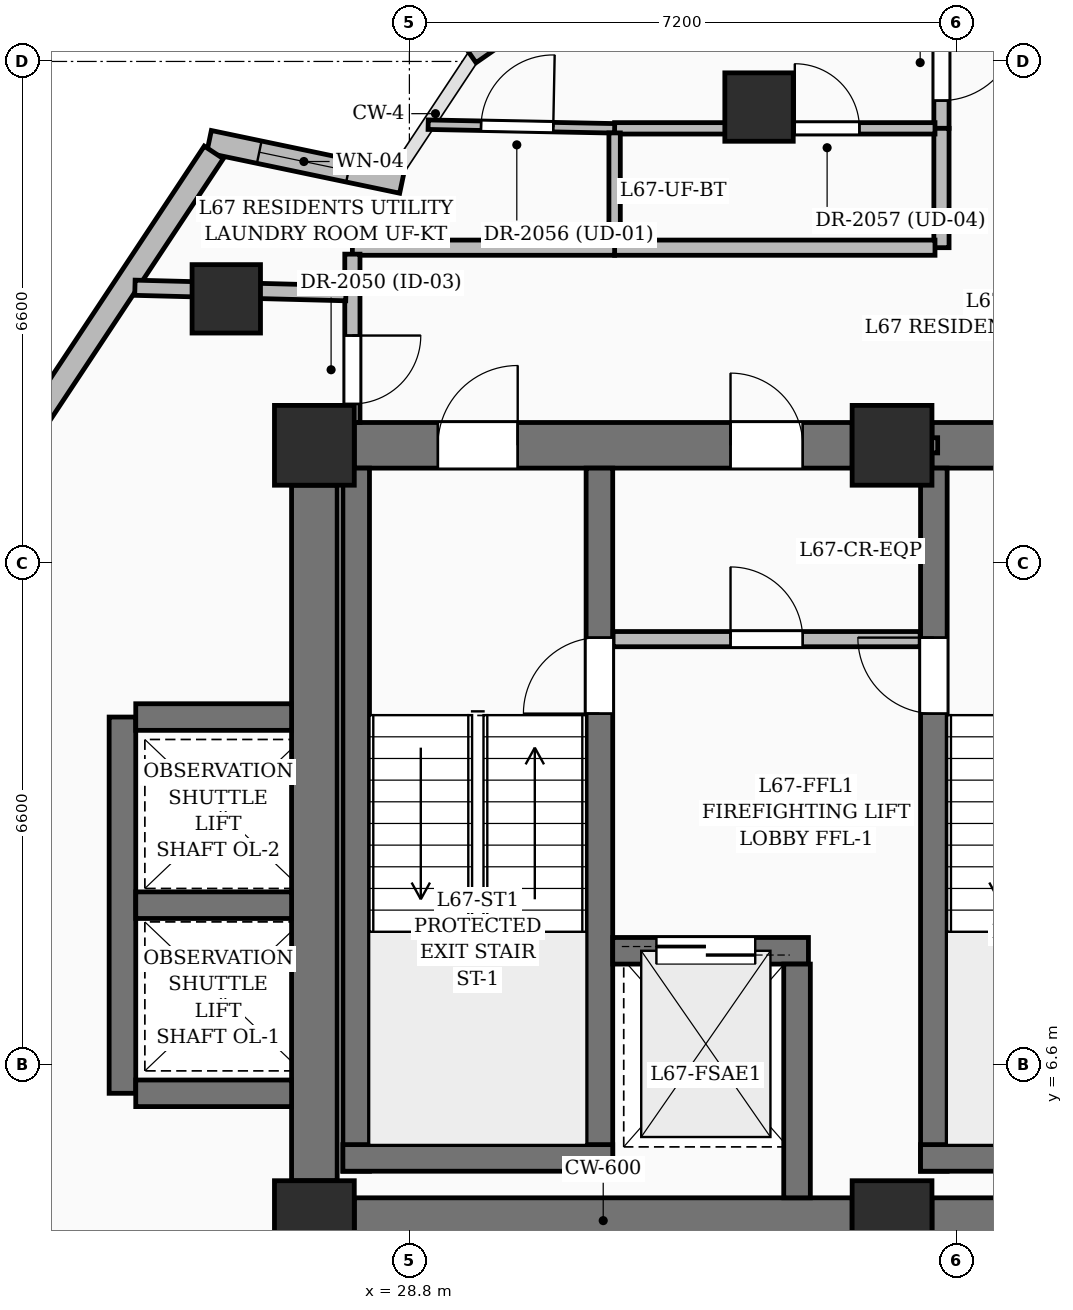
"""IFC4 building model, lengths in metres.
Left out: names, types, materials, properties, quantities, classifications, styles, units other than length and angle.
Written with IfcOpenShell. Run it as: python <this file> out.ifc"""

import sys

from ifc_helpers import new_model, si_unit, direction, frame, frame_2d, origin, origin_2d, place, context, subcontext, project, spatial, rectangle, extrude, element, fill, save


model = new_model("IFC4")
c1 = context("Model", 3, precision=1e-05, world=origin(), true_north=direction((0.0, 1.0)))
c2 = subcontext(c1, "Body", "Model", "MODEL_VIEW")
j1 = project(units=[si_unit("LENGTHUNIT", "METRE"), si_unit("PLANEANGLEUNIT", "RADIAN")], contexts=[c1])
p1 = place(None, origin())
s1 = spatial("IfcSite", under=j1, at=p1, CompositionType="ELEMENT")
p2 = place(p1, origin())
s2 = spatial("IfcBuilding", under=s1, at=p2, CompositionType="ELEMENT")
p3 = place(p2, frame((0.0, 0.0, 259.5)))
s3 = spatial("IfcBuildingStorey", under=s2, at=p3, CompositionType="ELEMENT", Elevation=259.5)
for number, where, z_axis, x_axis in (
    (1, (27.55, 4.55, 0.0), (0.0, 0.0, 1.0), (1.0, 0.0, 0.0)),
    (2, (35.15, 4.55, 0.0), (0.0, 0.0, 1.0), (1.0, 0.0, 0.0)),
    (3, (27.55, 14.75, 0.0), (0.0, 0.0, 1.0), (1.0, 0.0, 0.0)),
    (4, (35.15, 14.75, 0.0), (0.0, 0.0, 1.0), (1.0, 0.0, 0.0)),
):
    element("IfcColumn", number, at=place(p3, frame(where, z_axis=z_axis, x_axis=x_axis)), inside=s3, PredefinedType="COLUMN", context=c2, shape_type="SweptSolid", body=[
        extrude(rectangle(XDim=1.05, YDim=1.05, at=origin_2d()), origin(), (0.0, 0.0, 1.0), 3.75),
    ])
p4 = place(p3, frame((33.4, 19.2, 0.0), z_axis=(0.0, 0.0, 1.0), x_axis=(1.0, 0.0, 0.0)))
e5 = element("IfcColumn", 5, at=p4, inside=s3, PredefinedType="COLUMN", context=c2, shape_type="SweptSolid", body=[
    extrude(rectangle(XDim=0.9, YDim=0.9, at=origin_2d()), origin(), (0.0, 0.0, 1.0), 3.75),
])
p5 = place(p3, frame((28.075, 4.55, 0.0), z_axis=(0.0, 0.0, 1.0), x_axis=(1.0, 0.0, 0.0)))
e6 = element("IfcWall", 6, at=p5, inside=s3, PredefinedType="SHEAR", context=c2, shape_type="SweptSolid", body=[
    extrude(rectangle(XDim=6.55, YDim=0.6, at=frame_2d((3.275, 0.0))), origin(), (0.0, 0.0, 1.0), 3.75),
])
p6 = place(p3, frame((35.675, 4.55, 0.0), z_axis=(0.0, 0.0, 1.0), x_axis=(1.0, 0.0, 0.0)))
e7 = element("IfcWall", 7, at=p6, inside=s3, PredefinedType="SHEAR", context=c2, shape_type="SweptSolid", body=[
    extrude(rectangle(XDim=10.85, YDim=0.6, at=frame_2d((5.425, 0.0))), origin(), (0.0, 0.0, 1.0), 3.75),
])
p7 = place(p3, frame((28.075, 14.75, 0.0), z_axis=(0.0, 0.0, 1.0), x_axis=(1.0, 0.0, 0.0)))
e8 = element("IfcWall", 8, at=p7, inside=s3, PredefinedType="SHEAR", context=c2, shape_type="SweptSolid", body=[
    extrude(rectangle(XDim=6.55, YDim=0.6, at=frame_2d((3.275, 0.0))), origin(), (0.0, 0.0, 1.0), 3.75),
])
p8 = place(p7, frame((1.1, 0.0, 0.0)))
e9 = element("IfcOpeningElement", 9, at=p8, cuts=e8, PredefinedType="OPENING", context=c2, shape_type="SweptSolid", body=[
    extrude(rectangle(XDim=1.05, YDim=2.15, at=frame_2d((0.525, 1.075))), frame((0.0, 0.31, 0.0), z_axis=(0.0, -1.0, 0.0), x_axis=(1.0, 0.0, 0.0)), (0.0, 0.0, 1.0), 0.62),
])
p9 = place(p7, frame((4.95, 0.0, 0.0)))
e10 = element("IfcOpeningElement", 10, at=p9, cuts=e8, PredefinedType="OPENING", context=c2, shape_type="SweptSolid", body=[
    extrude(rectangle(XDim=0.95, YDim=2.15, at=frame_2d((0.475, 1.075))), frame((0.0, 0.31, 0.0), z_axis=(0.0, -1.0, 0.0), x_axis=(1.0, 0.0, 0.0)), (0.0, 0.0, 1.0), 0.62),
])
p10 = place(p3, frame((35.675, 14.75, 0.0), z_axis=(0.0, 0.0, 1.0), x_axis=(1.0, 0.0, 0.0)))
e11 = element("IfcWall", 11, at=p10, inside=s3, PredefinedType="SHEAR", context=c2, shape_type="SweptSolid", body=[
    extrude(rectangle(XDim=10.85, YDim=0.6, at=frame_2d((5.425, 0.0))), origin(), (0.0, 0.0, 1.0), 3.75),
])
p11 = place(p10, frame((1.1, 0.0, 0.0)))
e12 = element("IfcOpeningElement", 12, at=p11, cuts=e11, PredefinedType="OPENING", context=c2, shape_type="SweptSolid", body=[
    extrude(rectangle(XDim=1.05, YDim=2.15, at=frame_2d((0.525, 1.075))), frame((0.0, 0.31, 0.0), z_axis=(0.0, -1.0, 0.0), x_axis=(1.0, 0.0, 0.0)), (0.0, 0.0, 1.0), 0.62),
])
p12 = place(p10, frame((8.7, 0.0, 0.0)))
e13 = element("IfcOpeningElement", 13, at=p12, cuts=e11, PredefinedType="OPENING", context=c2, shape_type="SweptSolid", body=[
    extrude(rectangle(XDim=1.05, YDim=2.15, at=frame_2d((0.525, 1.075))), frame((0.0, 0.31, 0.0), z_axis=(0.0, -1.0, 0.0), x_axis=(1.0, 0.0, 0.0)), (0.0, 0.0, 1.0), 0.62),
])
p13 = place(p10, frame((3.825, 0.0, 0.0)))
e14 = element("IfcOpeningElement", 14, at=p13, cuts=e11, PredefinedType="OPENING", context=c2, shape_type="SweptSolid", body=[
    extrude(rectangle(XDim=1.2, YDim=2.2, at=frame_2d((0.6, 1.1))), frame((0.0, 0.31, 0.0), z_axis=(0.0, -1.0, 0.0), x_axis=(1.0, 0.0, 0.0)), (0.0, 0.0, 1.0), 0.62),
])
p14 = place(p10, frame((5.825, 0.0, 0.0)))
e15 = element("IfcOpeningElement", 15, at=p14, cuts=e11, PredefinedType="OPENING", context=c2, shape_type="SweptSolid", body=[
    extrude(rectangle(XDim=1.2, YDim=2.2, at=frame_2d((0.6, 1.1))), frame((0.0, 0.31, 0.0), z_axis=(0.0, -1.0, 0.0), x_axis=(1.0, 0.0, 0.0)), (0.0, 0.0, 1.0), 0.62),
])
p15 = place(p3, frame((27.55, 5.075, 0.0), z_axis=(0.0, 0.0, 1.0), x_axis=(0.0, 1.0, 0.0)))
e16 = element("IfcWall", 16, at=p15, inside=s3, PredefinedType="SHEAR", context=c2, shape_type="SweptSolid", body=[
    extrude(rectangle(XDim=9.15, YDim=0.6, at=frame_2d((4.575, 0.0))), origin(), (0.0, 0.0, 1.0), 3.75),
])
p16 = place(p3, frame((28.1, 5.2, 0.0), z_axis=(0.0, 0.0, 1.0), x_axis=(0.0, 1.0, 0.0)))
e17 = element("IfcWall", 17, at=p16, inside=s3, PredefinedType="SOLIDWALL", context=c2, shape_type="SweptSolid", body=[
    extrude(rectangle(XDim=9.25, YDim=0.35, at=frame_2d((4.625, 0.0))), origin(), (0.0, 0.0, 1.0), 3.75),
])
p17 = place(p3, frame((31.3, 5.2, 0.0), z_axis=(0.0, 0.0, 1.0), x_axis=(0.0, 1.0, 0.0)))
e18 = element("IfcWall", 18, at=p17, inside=s3, PredefinedType="SOLIDWALL", context=c2, shape_type="SweptSolid", body=[
    extrude(rectangle(XDim=9.25, YDim=0.35, at=frame_2d((4.625, 0.0))), origin(), (0.0, 0.0, 1.0), 3.75),
])
p18 = place(p17, frame((6.02, 0.0, 0.0)))
e19 = element("IfcOpeningElement", 19, at=p18, cuts=e18, PredefinedType="OPENING", context=c2, shape_type="SweptSolid", body=[
    extrude(rectangle(XDim=1.0, YDim=2.15, at=frame_2d((0.5, 1.075))), frame((0.0, 0.185, 0.0), z_axis=(0.0, -1.0, 0.0), x_axis=(1.0, 0.0, 0.0)), (0.0, 0.0, 1.0), 0.37),
])
p19 = place(p3, frame((27.925, 5.375, 0.0), z_axis=(0.0, 0.0, 1.0), x_axis=(1.0, 0.0, 0.0)))
e20 = element("IfcWall", 20, at=p19, inside=s3, PredefinedType="SOLIDWALL", context=c2, shape_type="SweptSolid", body=[
    extrude(rectangle(XDim=3.55, YDim=0.35, at=frame_2d((1.775, 0.0))), origin(), (0.0, 0.0, 1.0), 3.75),
])
p20 = place(p3, frame((35.7, 5.2, 0.0), z_axis=(0.0, 0.0, 1.0), x_axis=(0.0, 1.0, 0.0)))
e21 = element("IfcWall", 21, at=p20, inside=s3, PredefinedType="SOLIDWALL", context=c2, shape_type="SweptSolid", body=[
    extrude(rectangle(XDim=9.25, YDim=0.35, at=frame_2d((4.625, 0.0))), origin(), (0.0, 0.0, 1.0), 3.75),
])
p21 = place(p20, frame((6.02, 0.0, 0.0)))
e22 = element("IfcOpeningElement", 22, at=p21, cuts=e21, PredefinedType="OPENING", context=c2, shape_type="SweptSolid", body=[
    extrude(rectangle(XDim=1.0, YDim=2.15, at=frame_2d((0.5, 1.075))), frame((0.0, 0.185, 0.0), z_axis=(0.0, -1.0, 0.0), x_axis=(1.0, 0.0, 0.0)), (0.0, 0.0, 1.0), 0.37),
])
p22 = place(p3, frame((35.525, 5.375, 0.0), z_axis=(0.0, 0.0, 1.0), x_axis=(1.0, 0.0, 0.0)))
e23 = element("IfcWall", 23, at=p22, inside=s3, PredefinedType="SOLIDWALL", context=c2, shape_type="SweptSolid", body=[
    extrude(rectangle(XDim=3.55, YDim=0.35, at=frame_2d((1.775, 0.0))), origin(), (0.0, 0.0, 1.0), 3.75),
])
p23 = place(p3, frame((31.475, 8.1, 0.0), z_axis=(0.0, 0.0, 1.0), x_axis=(1.0, 0.0, 0.0)))
e24 = element("IfcWall", 24, at=p23, inside=s3, PredefinedType="SOLIDWALL", context=c2, shape_type="SweptSolid", body=[
    extrude(rectangle(XDim=2.575, YDim=0.35, at=frame_2d((1.288, 0.0))), origin(), (0.0, 0.0, 1.0), 3.75),
])
p24 = place(p23, frame((0.575, 0.0, 0.0)))
e25 = element("IfcOpeningElement", 25, at=p24, cuts=e24, PredefinedType="OPENING", context=c2, shape_type="SweptSolid", body=[
    extrude(rectangle(XDim=1.3, YDim=2.25, at=frame_2d((0.65, 1.125))), frame((0.0, 0.185, 0.0), z_axis=(0.0, -1.0, 0.0), x_axis=(1.0, 0.0, 0.0)), (0.0, 0.0, 1.0), 0.37),
])
p25 = place(p3, frame((33.9, 4.85, 0.0), z_axis=(0.0, 0.0, 1.0), x_axis=(0.0, 1.0, 0.0)))
e26 = element("IfcWall", 26, at=p25, inside=s3, PredefinedType="SOLIDWALL", context=c2, shape_type="SweptSolid", body=[
    extrude(rectangle(XDim=3.075, YDim=0.35, at=frame_2d((1.538, 0.0))), origin(), (0.0, 0.0, 1.0), 3.75),
])
p26 = place(p3, frame((25.025, 6.225, 0.0), z_axis=(0.0, 0.0, 1.0), x_axis=(0.0, 1.0, 0.0)))
e27 = element("IfcWall", 27, at=p26, inside=s3, PredefinedType="SOLIDWALL", context=c2, shape_type="SweptSolid", body=[
    extrude(rectangle(XDim=4.95, YDim=0.35, at=frame_2d((2.475, 0.0))), origin(), (0.0, 0.0, 1.0), 3.75),
])
for number, where, z_axis, x_axis in (
    (28, (25.2, 6.225, 0.0), (0.0, 0.0, 1.0), (1.0, 0.0, 0.0)),
    (29, (25.2, 8.7, 0.0), (0.0, 0.0, 1.0), (1.0, 0.0, 0.0)),
    (30, (25.2, 11.175, 0.0), (0.0, 0.0, 1.0), (1.0, 0.0, 0.0)),
):
    element("IfcWall", number, at=place(p3, frame(where, z_axis=z_axis, x_axis=x_axis)), inside=s3, PredefinedType="SOLIDWALL", context=c2, shape_type="SweptSolid", body=[
        extrude(rectangle(XDim=2.05, YDim=0.35, at=frame_2d((1.025, 0.0))), origin(), (0.0, 0.0, 1.0), 3.75),
    ])
p27 = place(p3, frame((26.391, 16.677, 0.0), z_axis=(0.0, 0.0, 1.0), x_axis=(1.0, 0.0, 0.0)))
e31 = element("IfcColumn", 31, at=p27, inside=s3, PredefinedType="COLUMN", context=c2, shape_type="SweptSolid", body=[
    extrude(rectangle(XDim=0.9, YDim=0.9, at=origin_2d()), origin(), (0.0, 0.0, 1.0), 3.75),
])
p28 = place(p3, frame((26.164, 18.745, 0.0), z_axis=(0.0, 0.0, 1.0), x_axis=(0.978800719283, -0.204814921162, 0.0)))
e32 = element("IfcWall", 32, at=p28, inside=s3, PredefinedType="SOLIDWALL", context=c2, shape_type="SweptSolid", body=[
    extrude(rectangle(XDim=2.594, YDim=0.3, at=frame_2d((1.297, 0.0))), origin(), (0.0, 0.0, 1.0), 2.825),
])
p29 = place(p28, frame((0.675, 0.0, 0.8)))
e33 = element("IfcOpeningElement", 33, at=p29, cuts=e32, PredefinedType="OPENING", context=c2, shape_type="SweptSolid", body=[
    extrude(rectangle(XDim=1.2, YDim=1.8, at=frame_2d((0.6, 0.9))), frame((0.0, 0.16, 0.0), z_axis=(0.0, -1.0, 0.0), x_axis=(1.0, 0.0, 0.0)), (0.0, 0.0, 1.0), 0.32),
])
p30 = place(p3, frame((29.8, 19.869, 0.0), z_axis=(0.0, 0.0, 1.0), x_axis=(-0.570863153193, 0.821045224288, 0.0)))
e34 = element("IfcWall", 34, at=p30, inside=s3, PredefinedType="SOLIDWALL", context=c2, shape_type="SweptSolid", body=[
    extrude(rectangle(XDim=2.594, YDim=0.3, at=frame_2d((1.297, 0.0))), origin(), (0.0, 0.0, 1.0), 2.825),
])
p31 = place(p3, frame((23.329, 14.228, 0.0), z_axis=(0.0, 0.0, 1.0), x_axis=(0.55209952842, 0.833778214347, 0.0)))
e35 = element("IfcWall", 35, at=p31, inside=s3, PredefinedType="SOLIDWALL", context=c2, shape_type="SweptSolid", body=[
    extrude(rectangle(XDim=5.248, YDim=0.3, at=frame_2d((2.624, 0.0))), origin(), (0.0, 0.0, 1.0), 3.5),
])
p32 = place(p3, frame((34.72, 14.75, 0.0), z_axis=(0.0, 0.0, 1.0), x_axis=(1.0, 0.0, 0.0)))
e36 = element("IfcWall", 36, at=p32, inside=s3, PredefinedType="PARTITIONING", context=c2, shape_type="SweptSolid", body=[
    extrude(rectangle(XDim=1.03, YDim=0.2, at=frame_2d((0.515, 0.0))), origin(), (0.0, 0.0, 1.0), 2.685),
])
p33 = place(p3, frame((31.48, 12.2, 0.0), z_axis=(0.0, 0.0, 1.0), x_axis=(1.0, 0.0, 0.0)))
e37 = element("IfcWall", 37, at=p33, inside=s3, PredefinedType="PARTITIONING", context=c2, shape_type="SweptSolid", body=[
    extrude(rectangle(XDim=4.04, YDim=0.2, at=frame_2d((2.02, 0.0))), origin(), (0.0, 0.0, 1.0), 3.5),
])
p34 = place(p33, frame((1.545, 0.0, 0.0)))
e38 = element("IfcOpeningElement", 38, at=p34, cuts=e37, PredefinedType="OPENING", context=c2, shape_type="SweptSolid", body=[
    extrude(rectangle(XDim=0.95, YDim=2.15, at=frame_2d((0.475, 1.075))), frame((0.0, 0.11, 0.0), z_axis=(0.0, -1.0, 0.0), x_axis=(1.0, 0.0, 0.0)), (0.0, 0.0, 1.0), 0.22),
])
p35 = place(p3, frame((28.05, 16.75, 0.0), z_axis=(0.0, 0.0, 1.0), x_axis=(0.0, -1.0, 0.0)))
e39 = element("IfcWall", 39, at=p35, inside=s3, PredefinedType="PARTITIONING", context=c2, shape_type="SweptSolid", body=[
    extrude(rectangle(XDim=1.7, YDim=0.2, at=frame_2d((0.85, 0.0))), origin(), (0.0, 0.0, 1.0), 3.5),
])
p36 = place(p35, frame((0.556, 0.0, 0.0)))
e40 = element("IfcOpeningElement", 40, at=p36, cuts=e39, PredefinedType="OPENING", context=c2, shape_type="SweptSolid", body=[
    extrude(rectangle(XDim=0.9, YDim=2.1, at=frame_2d((0.45, 1.05))), frame((0.0, 0.11, 0.0), z_axis=(0.0, -1.0, 0.0), x_axis=(1.0, 0.0, 0.0)), (0.0, 0.0, 1.0), 0.22),
])
p37 = place(p3, frame((35.8, 20.65, 0.0), z_axis=(0.0, 0.0, 1.0), x_axis=(0.0, -1.0, 0.0)))
e41 = element("IfcWall", 41, at=p37, inside=s3, PredefinedType="PARTITIONING", context=c2, shape_type="SweptSolid", body=[
    extrude(rectangle(XDim=1.73, YDim=0.2, at=frame_2d((0.865, 0.0))), origin(), (0.0, 0.0, 1.0), 3.5),
])
p38 = place(p37, frame((0.365, 0.0, 0.0)))
e42 = element("IfcOpeningElement", 42, at=p38, cuts=e41, PredefinedType="OPENING", context=c2, shape_type="SweptSolid", body=[
    extrude(rectangle(XDim=1.0, YDim=2.2, at=frame_2d((0.5, 1.1))), frame((0.0, 0.11, 0.0), z_axis=(0.0, -1.0, 0.0), x_axis=(1.0, 0.0, 0.0)), (0.0, 0.0, 1.0), 0.22),
])
p39 = place(p3, frame((35.8, 18.92, 0.0), z_axis=(0.0, 0.0, 1.0), x_axis=(0.0, -1.0, 0.0)))
e43 = element("IfcWall", 43, at=p39, inside=s3, PredefinedType="PARTITIONING", context=c2, shape_type="SweptSolid", body=[
    extrude(rectangle(XDim=1.57, YDim=0.2, at=frame_2d((0.785, 0.0))), origin(), (0.0, 0.0, 1.0), 3.5),
])
p40 = place(p3, frame((35.715, 17.35, 0.0), z_axis=(0.0, 0.0, 1.0), x_axis=(-1.0, 0.0, 0.0)))
e44 = element("IfcWall", 44, at=p40, inside=s3, PredefinedType="PARTITIONING", context=c2, shape_type="SweptSolid", body=[
    extrude(rectangle(XDim=4.215, YDim=0.2, at=frame_2d((2.107, 0.0))), origin(), (0.0, 0.0, 1.0), 2.685),
])
p41 = place(p3, frame((31.5, 17.35, 0.0), z_axis=(0.0, 0.0, 1.0), x_axis=(-1.0, 0.0, 0.0)))
e45 = element("IfcWall", 45, at=p41, inside=s3, PredefinedType="PARTITIONING", context=c2, shape_type="SweptSolid", body=[
    extrude(rectangle(XDim=3.45, YDim=0.2, at=frame_2d((1.725, 0.0))), origin(), (0.0, 0.0, 1.0), 3.5),
])
p42 = place(p3, frame((28.05, 17.265, 0.0), z_axis=(0.0, 0.0, 1.0), x_axis=(0.0, -1.0, 0.0)))
e46 = element("IfcWall", 46, at=p42, inside=s3, PredefinedType="PARTITIONING", context=c2, shape_type="SweptSolid", body=[
    extrude(rectangle(XDim=0.515, YDim=0.2, at=frame_2d((0.257, 0.0))), origin(), (0.0, 0.0, 1.0), 3.5),
])
p43 = place(p3, frame((27.965, 16.751, 0.0), z_axis=(0.0, 0.0, 1.0), x_axis=(-0.99966592062, 0.025846608096, 0.0)))
e47 = element("IfcWall", 47, at=p43, inside=s3, PredefinedType="PARTITIONING", context=c2, shape_type="SweptSolid", body=[
    extrude(rectangle(XDim=2.777, YDim=0.2, at=frame_2d((1.389, 0.0))), origin(), (0.0, 0.0, 1.0), 3.5),
])
p44 = place(p3, frame((31.5, 18.92, 0.0), z_axis=(0.0, 0.0, 1.0), x_axis=(1.0, 0.0, 0.0)))
e48 = element("IfcWall", 48, at=p44, inside=s3, PredefinedType="PARTITIONING", context=c2, shape_type="SweptSolid", body=[
    extrude(rectangle(XDim=4.215, YDim=0.15, at=frame_2d((2.107, 0.0))), origin(), (0.0, 0.0, 1.0), 3.5),
])
p45 = place(p44, frame((2.371, 0.0, 0.0)))
e49 = element("IfcOpeningElement", 49, at=p45, cuts=e48, PredefinedType="OPENING", context=c2, shape_type="SweptSolid", body=[
    extrude(rectangle(XDim=0.85, YDim=2.1, at=frame_2d((0.425, 1.05))), frame((0.0, 0.085, 0.0), z_axis=(0.0, -1.0, 0.0), x_axis=(1.0, 0.0, 0.0)), (0.0, 0.0, 1.0), 0.17),
])
p46 = place(p3, frame((29.047, 18.968, 0.0), z_axis=(0.0, 0.0, 1.0), x_axis=(0.999807821657, -0.019604074934, 0.0)))
e50 = element("IfcWall", 50, at=p46, inside=s3, PredefinedType="PARTITIONING", context=c2, shape_type="SweptSolid", body=[
    extrude(rectangle(XDim=2.453, YDim=0.125, at=frame_2d((1.227, 0.0))), origin(), (0.0, 0.0, 1.0), 3.5),
])
p47 = place(p46, frame((0.696, 0.0, 0.0)))
e51 = element("IfcOpeningElement", 51, at=p47, cuts=e50, PredefinedType="OPENING", context=c2, shape_type="SweptSolid", body=[
    extrude(rectangle(XDim=0.95, YDim=2.2, at=frame_2d((0.475, 1.1))), frame((0.0, 0.072, 0.0), z_axis=(0.0, -1.0, 0.0), x_axis=(1.0, 0.0, 0.0)), (0.0, 0.0, 1.0), 0.145),
])
p48 = place(p3, frame((31.5, 18.86, 0.0), z_axis=(0.0, 0.0, 1.0), x_axis=(0.0, -1.0, 0.0)))
e52 = element("IfcWall", 52, at=p48, inside=s3, PredefinedType="PARTITIONING", context=c2, shape_type="SweptSolid", body=[
    extrude(rectangle(XDim=1.425, YDim=0.15, at=frame_2d((0.712, 0.0))), origin(), (0.0, 0.0, 1.0), 3.5),
])
p49 = place(p29, origin())
e53 = element("IfcWindow", 53, at=p49, inside=s3, PartitioningType="SINGLE_PANEL", PredefinedType="WINDOW", context=c2, shape_type="SweptSolid", body=[
    extrude(rectangle(XDim=1.2, YDim=1.8, at=frame_2d((0.6, 0.9))), frame((0.0, 0.03, 0.0), z_axis=(0.0, -1.0, 0.0), x_axis=(1.0, 0.0, 0.0)), (0.0, 0.0, 1.0), 0.06),
])
fill(e33, e53)
p50 = place(p8, origin())
e54 = element("IfcDoor", 54, at=p50, inside=s3, OperationType="SINGLE_SWING_RIGHT", PredefinedType="DOOR", context=c2, shape_type="SweptSolid", body=[
    extrude(rectangle(XDim=1.05, YDim=2.15, at=frame_2d((0.525, 1.075))), frame((0.0, 0.025, 0.0), z_axis=(0.0, -1.0, 0.0), x_axis=(1.0, 0.0, 0.0)), (0.0, 0.0, 1.0), 0.05),
])
fill(e9, e54)
p51 = place(p18, origin())
e55 = element("IfcDoor", 55, at=p51, inside=s3, OperationType="SINGLE_SWING_LEFT", PredefinedType="DOOR", context=c2, shape_type="SweptSolid", body=[
    extrude(rectangle(XDim=1.0, YDim=2.15, at=frame_2d((0.5, 1.075))), frame((0.0, 0.025, 0.0), z_axis=(0.0, -1.0, 0.0), x_axis=(1.0, 0.0, 0.0)), (0.0, 0.0, 1.0), 0.05),
])
fill(e19, e55)
p52 = place(p21, origin())
e56 = element("IfcDoor", 56, at=p52, inside=s3, OperationType="SINGLE_SWING_RIGHT", PredefinedType="DOOR", context=c2, shape_type="SweptSolid", body=[
    extrude(rectangle(XDim=1.0, YDim=2.15, at=frame_2d((0.5, 1.075))), frame((0.0, 0.025, 0.0), z_axis=(0.0, -1.0, 0.0), x_axis=(1.0, 0.0, 0.0)), (0.0, 0.0, 1.0), 0.05),
])
fill(e22, e56)
p53 = place(p24, origin())
e57 = element("IfcDoor", 57, at=p53, inside=s3, OperationType="DOUBLE_DOOR_SLIDING", PredefinedType="DOOR", context=c2, shape_type="SweptSolid", body=[
    extrude(rectangle(XDim=1.3, YDim=2.25, at=frame_2d((0.65, 1.125))), frame((0.0, 0.025, 0.0), z_axis=(0.0, -1.0, 0.0), x_axis=(1.0, 0.0, 0.0)), (0.0, 0.0, 1.0), 0.05),
])
fill(e25, e57)
p54 = place(p34, origin())
e58 = element("IfcDoor", 58, at=p54, inside=s3, OperationType="SINGLE_SWING_LEFT", PredefinedType="DOOR", context=c2, shape_type="SweptSolid", body=[
    extrude(rectangle(XDim=0.95, YDim=2.15, at=frame_2d((0.475, 1.075))), frame((0.0, 0.025, 0.0), z_axis=(0.0, -1.0, 0.0), x_axis=(1.0, 0.0, 0.0)), (0.0, 0.0, 1.0), 0.05),
])
fill(e38, e58)
p55 = place(p9, origin())
e59 = element("IfcDoor", 59, at=p55, inside=s3, OperationType="SINGLE_SWING_LEFT", PredefinedType="DOOR", context=c2, shape_type="SweptSolid", body=[
    extrude(rectangle(XDim=0.95, YDim=2.15, at=frame_2d((0.475, 1.075))), frame((0.0, 0.025, 0.0), z_axis=(0.0, -1.0, 0.0), x_axis=(1.0, 0.0, 0.0)), (0.0, 0.0, 1.0), 0.05),
])
fill(e10, e59)
p56 = place(p36, origin())
e60 = element("IfcDoor", 60, at=p56, inside=s3, OperationType="SINGLE_SWING_LEFT", PredefinedType="DOOR", context=c2, shape_type="SweptSolid", body=[
    extrude(rectangle(XDim=0.9, YDim=2.1, at=frame_2d((0.45, 1.05))), frame((0.0, 0.025, 0.0), z_axis=(0.0, -1.0, 0.0), x_axis=(1.0, 0.0, 0.0)), (0.0, 0.0, 1.0), 0.05),
])
fill(e40, e60)
p57 = place(p38, origin())
e61 = element("IfcDoor", 61, at=p57, inside=s3, OperationType="SINGLE_SWING_LEFT", PredefinedType="DOOR", context=c2, shape_type="SweptSolid", body=[
    extrude(rectangle(XDim=1.0, YDim=2.2, at=frame_2d((0.5, 1.1))), frame((0.0, 0.025, 0.0), z_axis=(0.0, -1.0, 0.0), x_axis=(1.0, 0.0, 0.0)), (0.0, 0.0, 1.0), 0.05),
])
fill(e42, e61)
p58 = place(p47, origin())
e62 = element("IfcDoor", 62, at=p58, inside=s3, OperationType="SINGLE_SWING_RIGHT", PredefinedType="DOOR", context=c2, shape_type="SweptSolid", body=[
    extrude(rectangle(XDim=0.95, YDim=2.2, at=frame_2d((0.475, 1.1))), frame((0.0, 0.025, 0.0), z_axis=(0.0, -1.0, 0.0), x_axis=(1.0, 0.0, 0.0)), (0.0, 0.0, 1.0), 0.05),
])
fill(e51, e62)
p59 = place(p45, origin())
e63 = element("IfcDoor", 63, at=p59, inside=s3, OperationType="SINGLE_SWING_LEFT", PredefinedType="DOOR", context=c2, shape_type="SweptSolid", body=[
    extrude(rectangle(XDim=0.85, YDim=2.1, at=frame_2d((0.425, 1.05))), frame((0.0, 0.025, 0.0), z_axis=(0.0, -1.0, 0.0), x_axis=(1.0, 0.0, 0.0)), (0.0, 0.0, 1.0), 0.05),
])
fill(e49, e63)
save(model, sys.argv[1])
